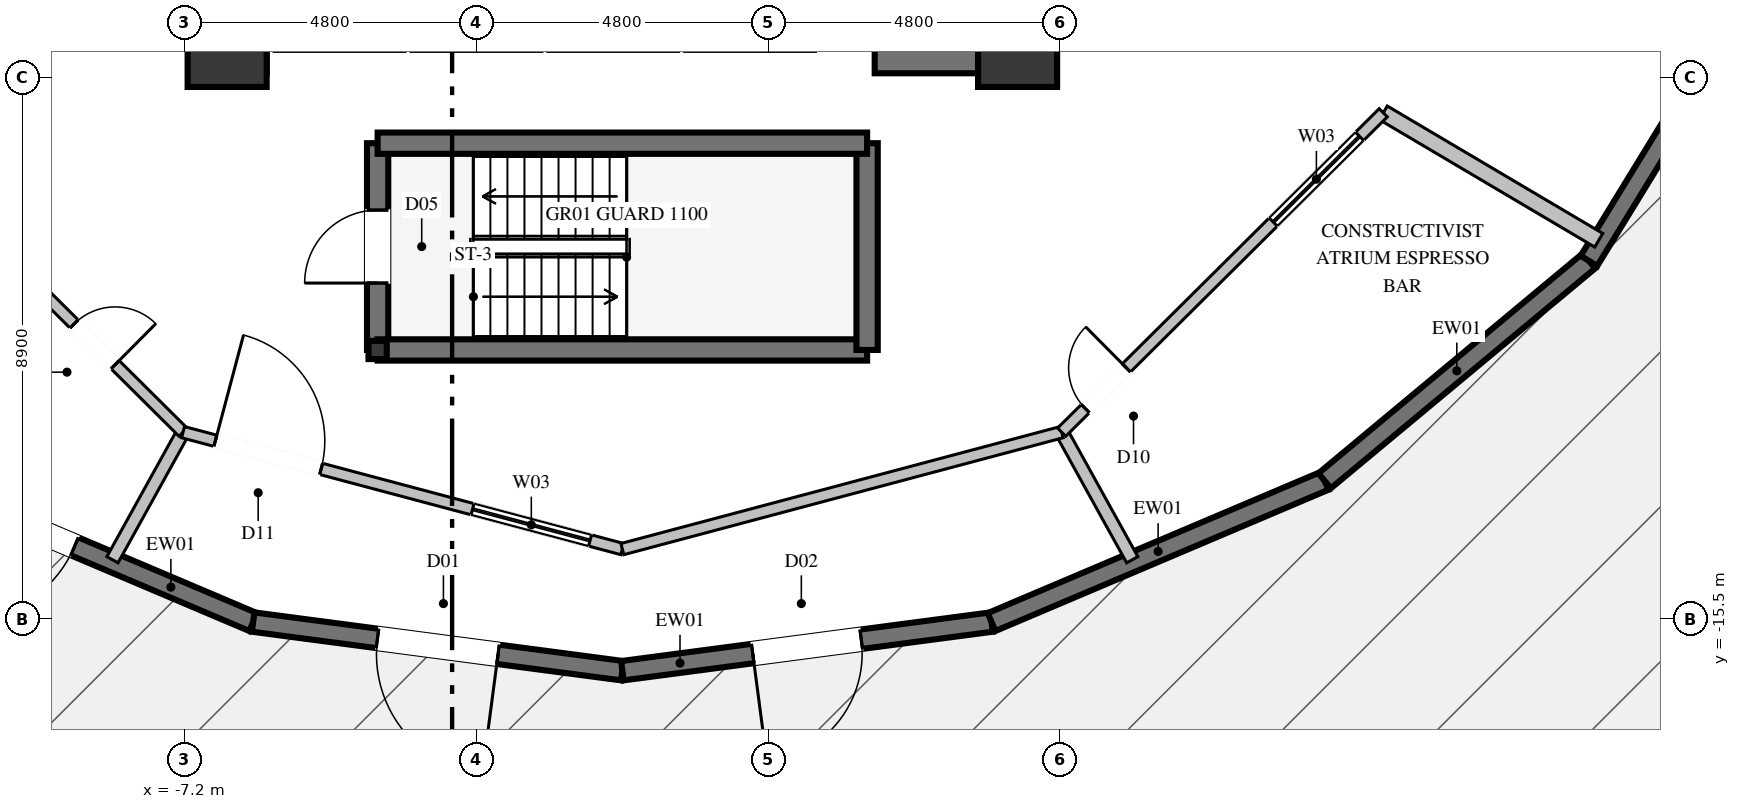
"""IFC4 building model, lengths in metres.
Left out: names, types, materials, properties, quantities, classifications, styles, units other than length and angle.
Written with IfcOpenShell. Run it as: python <this file> out.ifc"""

import sys

from ifc_helpers import new_model, si_unit, direction, frame, frame_2d, origin, origin_2d, place, context, subcontext, project, spatial, rectangle, hollow_rectangle, extrude, element, fill, save


model = new_model("IFC4")
c1 = context("Model", 3, precision=1e-05, world=origin(), true_north=direction((0.0, 1.0)))
c2 = subcontext(c1, "Body", "Model", "MODEL_VIEW")
j1 = project(units=[si_unit("LENGTHUNIT", "METRE"), si_unit("PLANEANGLEUNIT", "RADIAN")], contexts=[c1])
p1 = place(None, origin())
s1 = spatial("IfcSite", under=j1, at=p1, CompositionType="ELEMENT")
p2 = place(p1, origin())
s2 = spatial("IfcBuilding", under=s1, at=p2, CompositionType="ELEMENT")
p3 = place(p2, origin())
s3 = spatial("IfcBuildingStorey", under=s2, at=p3, CompositionType="ELEMENT", Elevation=0.0)
for number, where, z_axis, x_axis in (
    (1, (-6.5, -6.1, 0.0), (0.0, 0.0, 1.0), (1.0, 0.0, 0.0)),
    (2, (6.5, -6.1, 0.0), (0.0, 0.0, 1.0), (1.0, 0.0, 0.0)),
):
    element("IfcColumn", number, at=place(p3, frame(where, z_axis=z_axis, x_axis=x_axis)), inside=s3, PredefinedType="COLUMN", context=c2, shape_type="SweptSolid", body=[
        extrude(rectangle(XDim=1.3, YDim=1.3, at=origin_2d()), origin(), (0.0, 0.0, 1.0), 7.2),
    ])
p4 = place(p3, frame((-6.075, -6.1, 0.0), z_axis=(0.0, 0.0, 1.0), x_axis=(1.0, 0.0, 0.0)))
e3 = element("IfcWall", 3, at=p4, inside=s3, PredefinedType="SHEAR", context=c2, shape_type="SweptSolid", body=[
    extrude(rectangle(XDim=0.225, YDim=0.85, at=frame_2d((0.112, 0.0))), origin(), (0.0, 0.0, 1.0), 7.2),
])
p5 = place(p3, frame((4.15, -6.1, 0.0), z_axis=(0.0, 0.0, 1.0), x_axis=(1.0, 0.0, 0.0)))
e4 = element("IfcWall", 4, at=p5, inside=s3, PredefinedType="SHEAR", context=c2, shape_type="SweptSolid", body=[
    extrude(rectangle(XDim=1.925, YDim=0.85, at=frame_2d((0.962, 0.0))), origin(), (0.0, 0.0, 1.0), 7.2),
])
p6 = place(p3, frame((-6.5, -6.525, 0.0), z_axis=(0.0, 0.0, 1.0), x_axis=(0.0, 1.0, 0.0)))
e5 = element("IfcWall", 5, at=p6, inside=s3, PredefinedType="SHEAR", context=c2, shape_type="SweptSolid", body=[
    extrude(rectangle(XDim=3.175, YDim=0.85, at=frame_2d((1.587, 0.0))), origin(), (0.0, 0.0, 1.0), 7.2),
])
p7 = place(p3, frame((6.5, -6.525, 0.0), z_axis=(0.0, 0.0, 1.0), x_axis=(0.0, 1.0, 0.0)))
e6 = element("IfcWall", 6, at=p7, inside=s3, PredefinedType="SHEAR", context=c2, shape_type="SweptSolid", body=[
    extrude(rectangle(XDim=4.175, YDim=0.85, at=frame_2d((2.087, 0.0))), origin(), (0.0, 0.0, 1.0), 7.2),
])
p8 = place(p3, frame((-4.025, -11.075, 0.0), z_axis=(0.0, 0.0, 1.0), x_axis=(1.0, 0.0, 0.0)))
e7 = element("IfcColumn", 7, at=p8, inside=s3, PredefinedType="COLUMN", context=c2, shape_type="SweptSolid", body=[
    extrude(hollow_rectangle(XDim=0.3, YDim=0.3, WallThickness=0.016, at=origin_2d()), origin(), (0.0, 0.0, 1.0), 7.2),
])
p9 = place(p3, frame((-6.072, -15.55, 0.0), z_axis=(0.0, 0.0, 1.0), x_axis=(-0.920643013012, 0.390405484839, 0.0)))
e8 = element("IfcWall", 8, at=p9, inside=s3, PredefinedType="SOLIDWALL", context=c2, shape_type="SweptSolid", body=[
    extrude(rectangle(XDim=5.95, YDim=0.32, at=frame_2d((2.975, 0.0))), origin(), (0.0, 0.0, 1.0), 6.84),
])
p10 = place(p9, frame((3.19, 0.0, 0.0)))
e9 = element("IfcOpeningElement", 9, at=p10, cuts=e8, PredefinedType="OPENING", context=c2, shape_type="SweptSolid", body=[
    extrude(rectangle(XDim=2.0, YDim=2.4, at=frame_2d((1.0, 1.2))), frame((0.0, 0.17, 0.0), z_axis=(0.0, -1.0, 0.0), x_axis=(1.0, 0.0, 0.0)), (0.0, 0.0, 1.0), 0.34),
])
p11 = place(p3, frame((0.0, -16.35, 0.0), z_axis=(0.0, 0.0, 1.0), x_axis=(-0.991431078494, 0.130630840908, 0.0)))
e10 = element("IfcWall", 10, at=p11, inside=s3, PredefinedType="SOLIDWALL", context=c2, shape_type="SweptSolid", body=[
    extrude(rectangle(XDim=6.125, YDim=0.32, at=frame_2d((3.062, 0.0))), origin(), (0.0, 0.0, 1.0), 6.84),
])
p12 = place(p11, frame((2.062, 0.0, 0.0)))
e11 = element("IfcOpeningElement", 11, at=p12, cuts=e10, PredefinedType="OPENING", context=c2, shape_type="SweptSolid", body=[
    extrude(rectangle(XDim=2.0, YDim=2.4, at=frame_2d((1.0, 1.2))), frame((0.0, 0.17, 0.0), z_axis=(0.0, -1.0, 0.0), x_axis=(1.0, 0.0, 0.0)), (0.0, 0.0, 1.0), 0.34),
])
p13 = place(p3, frame((6.072, -15.55, 0.0), z_axis=(0.0, 0.0, 1.0), x_axis=(-0.991431078494, -0.130630840908, 0.0)))
e12 = element("IfcWall", 12, at=p13, inside=s3, PredefinedType="SOLIDWALL", context=c2, shape_type="SweptSolid", body=[
    extrude(rectangle(XDim=6.125, YDim=0.32, at=frame_2d((3.062, 0.0))), origin(), (0.0, 0.0, 1.0), 6.84),
])
p14 = place(p13, frame((2.162, 0.0, 0.0)))
e13 = element("IfcOpeningElement", 13, at=p14, cuts=e12, PredefinedType="OPENING", context=c2, shape_type="SweptSolid", body=[
    extrude(rectangle(XDim=1.8, YDim=2.4, at=frame_2d((0.9, 1.2))), frame((0.0, 0.17, 0.0), z_axis=(0.0, -1.0, 0.0), x_axis=(1.0, 0.0, 0.0)), (0.0, 0.0, 1.0), 0.34),
])
p15 = place(p3, frame((11.55, -13.227, 0.0), z_axis=(0.0, 0.0, 1.0), x_axis=(-0.920643013012, -0.390405484839, 0.0)))
e14 = element("IfcWall", 14, at=p15, inside=s3, PredefinedType="SOLIDWALL", context=c2, shape_type="SweptSolid", body=[
    extrude(rectangle(XDim=5.95, YDim=0.32, at=frame_2d((2.975, 0.0))), origin(), (0.0, 0.0, 1.0), 6.84),
])
p16 = place(p3, frame((15.897, -9.61, 0.0), z_axis=(0.0, 0.0, 1.0), x_axis=(-0.768698801906, -0.639610937952, 0.0)))
e15 = element("IfcWall", 15, at=p16, inside=s3, PredefinedType="SOLIDWALL", context=c2, shape_type="SweptSolid", body=[
    extrude(rectangle(XDim=5.655, YDim=0.32, at=frame_2d((2.828, 0.0))), origin(), (0.0, 0.0, 1.0), 6.84),
])
p17 = place(p3, frame((18.688, -5.052, 0.0), z_axis=(0.0, 0.0, 1.0), x_axis=(-0.522199966643, -0.852823073585, 0.0)))
e16 = element("IfcWall", 16, at=p17, inside=s3, PredefinedType="SOLIDWALL", context=c2, shape_type="SweptSolid", body=[
    extrude(rectangle(XDim=5.345, YDim=0.32, at=frame_2d((2.672, 0.0))), origin(), (0.0, 0.0, 1.0), 6.84),
])
p18 = place(p3, frame((-4.025, -11.075, 0.0), z_axis=(0.0, 0.0, 1.0), x_axis=(0.0, 1.0, 0.0)))
e17 = element("IfcWall", 17, at=p18, inside=s3, PredefinedType="SOLIDWALL", context=c2, shape_type="SweptSolid", body=[
    extrude(rectangle(XDim=3.4, YDim=0.35, at=frame_2d((1.7, 0.0))), origin(), (0.0, 0.0, 1.0), 6.84),
])
p19 = place(p18, frame((1.1, 0.0, 0.0)))
e18 = element("IfcOpeningElement", 18, at=p19, cuts=e17, PredefinedType="OPENING", context=c2, shape_type="SweptSolid", body=[
    extrude(rectangle(XDim=1.2, YDim=2.2, at=frame_2d((0.6, 1.1))), frame((0.0, 0.185, 0.0), z_axis=(0.0, -1.0, 0.0), x_axis=(1.0, 0.0, 0.0)), (0.0, 0.0, 1.0), 0.37),
])
p20 = place(p3, frame((-4.025, -11.075, 0.0), z_axis=(0.0, 0.0, 1.0), x_axis=(1.0, 0.0, 0.0)))
e19 = element("IfcWall", 19, at=p20, inside=s3, PredefinedType="SOLIDWALL", context=c2, shape_type="SweptSolid", body=[
    extrude(rectangle(XDim=8.05, YDim=0.35, at=frame_2d((4.025, 0.0))), origin(), (0.0, 0.0, 1.0), 6.84),
])
p21 = place(p3, frame((4.025, -11.075, 0.0), z_axis=(0.0, 0.0, 1.0), x_axis=(0.0, 1.0, 0.0)))
e20 = element("IfcWall", 20, at=p21, inside=s3, PredefinedType="SOLIDWALL", context=c2, shape_type="SweptSolid", body=[
    extrude(rectangle(XDim=3.4, YDim=0.35, at=frame_2d((1.7, 0.0))), origin(), (0.0, 0.0, 1.0), 6.84),
])
p22 = place(p3, frame((4.025, -7.675, 0.0), z_axis=(0.0, 0.0, 1.0), x_axis=(-1.0, 0.0, 0.0)))
e21 = element("IfcWall", 21, at=p22, inside=s3, PredefinedType="SOLIDWALL", context=c2, shape_type="SweptSolid", body=[
    extrude(rectangle(XDim=8.05, YDim=0.35, at=frame_2d((4.025, 0.0))), origin(), (0.0, 0.0, 1.0), 6.84),
])
for number, where, z_axis, x_axis in (
    (22, (-7.225, -12.427, 0.0), (0.0, 0.0, 1.0), (-0.484, -0.875, 0.0)),
    (23, (7.225, -12.427, 0.0), (0.0, 0.0, 1.0), (0.484, -0.875, 0.0)),
):
    element("IfcWall", number, at=place(p3, frame(where, z_axis=z_axis, x_axis=x_axis)), inside=s3, PredefinedType="PARTITIONING", context=c2, shape_type="SweptSolid", body=[
        extrude(rectangle(XDim=2.398, YDim=0.21, at=frame_2d((1.199, 0.0))), origin(), (0.0, 0.0, 1.0), 4.625),
    ])
p23 = place(p3, frame((12.514, -7.175, 0.0), z_axis=(0.0, 0.0, 1.0), x_axis=(0.860750596586, -0.509026925101, 0.0)))
e24 = element("IfcWall", 24, at=p23, inside=s3, PredefinedType="PARTITIONING", context=c2, shape_type="SweptSolid", body=[
    extrude(rectangle(XDim=4.118, YDim=0.26, at=frame_2d((2.059, 0.0))), origin(), (0.0, 0.0, 1.0), 4.625),
])
p24 = place(p3, frame((-10.134, -9.538, 0.0), z_axis=(0.0, 0.0, 1.0), x_axis=(0.709544136177, -0.704660995668, 0.0)))
e25 = element("IfcWall", 25, at=p24, inside=s3, PredefinedType="PARTITIONING", context=c2, shape_type="SweptSolid", body=[
    extrude(rectangle(XDim=4.1, YDim=0.19, at=frame_2d((2.05, 0.0))), origin(), (0.0, 0.0, 1.0), 6.84),
])
p25 = place(p24, frame((1.575, 0.0, 0.0)))
e26 = element("IfcOpeningElement", 26, at=p25, cuts=e25, PredefinedType="OPENING", context=c2, shape_type="SweptSolid", body=[
    extrude(rectangle(XDim=0.95, YDim=2.1, at=frame_2d((0.475, 1.05))), frame((0.0, 0.105, 0.0), z_axis=(0.0, -1.0, 0.0), x_axis=(1.0, 0.0, 0.0)), (0.0, 0.0, 1.0), 0.21),
])
p26 = place(p3, frame((-7.225, -12.427, 0.0), z_axis=(0.0, 0.0, 1.0), x_axis=(0.966354610728, -0.25721346451, 0.0)))
e27 = element("IfcWall", 27, at=p26, inside=s3, PredefinedType="PARTITIONING", context=c2, shape_type="SweptSolid", body=[
    extrude(rectangle(XDim=7.477, YDim=0.19, at=frame_2d((3.738, 0.0))), origin(), (0.0, 0.0, 1.0), 6.84),
])
p27 = place(p26, frame((0.55, 0.0, 0.0)))
e28 = element("IfcOpeningElement", 28, at=p27, cuts=e27, PredefinedType="OPENING", context=c2, shape_type="SweptSolid", body=[
    extrude(rectangle(XDim=1.8, YDim=2.4, at=frame_2d((0.9, 1.2))), frame((0.0, 0.105, 0.0), z_axis=(0.0, -1.0, 0.0), x_axis=(1.0, 0.0, 0.0)), (0.0, 0.0, 1.0), 0.21),
])
p28 = place(p26, frame((4.927, 0.0, 0.9)))
e29 = element("IfcOpeningElement", 29, at=p28, cuts=e27, PredefinedType="OPENING", context=c2, shape_type="SweptSolid", body=[
    extrude(rectangle(XDim=2.0, YDim=1.6, at=frame_2d((1.0, 0.8))), frame((0.0, 0.105, 0.0), z_axis=(0.0, -1.0, 0.0), x_axis=(1.0, 0.0, 0.0)), (0.0, 0.0, 1.0), 0.21),
])
p29 = place(p3, frame((0.0, -14.35, 0.0), z_axis=(0.0, 0.0, 1.0), x_axis=(0.966354610728, 0.25721346451, 0.0)))
e30 = element("IfcWall", 30, at=p29, inside=s3, PredefinedType="PARTITIONING", context=c2, shape_type="SweptSolid", body=[
    extrude(rectangle(XDim=7.477, YDim=0.19, at=frame_2d((3.738, 0.0))), origin(), (0.0, 0.0, 1.0), 6.84),
])
p30 = place(p3, frame((7.225, -12.427, 0.0), z_axis=(0.0, 0.0, 1.0), x_axis=(0.709575472763, 0.704629440524, 0.0)))
e31 = element("IfcWall", 31, at=p30, inside=s3, PredefinedType="PARTITIONING", context=c2, shape_type="SweptSolid", body=[
    extrude(rectangle(XDim=7.454, YDim=0.19, at=frame_2d((3.727, 0.0))), origin(), (0.0, 0.0, 1.0), 6.84),
])
p31 = place(p30, frame((0.55, 0.0, 0.0)))
e32 = element("IfcOpeningElement", 32, at=p31, cuts=e31, PredefinedType="OPENING", context=c2, shape_type="SweptSolid", body=[
    extrude(rectangle(XDim=0.95, YDim=2.1, at=frame_2d((0.475, 1.05))), frame((0.0, 0.105, 0.0), z_axis=(0.0, -1.0, 0.0), x_axis=(1.0, 0.0, 0.0)), (0.0, 0.0, 1.0), 0.21),
])
p32 = place(p30, frame((4.904, 0.0, 0.9)))
e33 = element("IfcOpeningElement", 33, at=p32, cuts=e31, PredefinedType="OPENING", context=c2, shape_type="SweptSolid", body=[
    extrude(rectangle(XDim=2.0, YDim=1.6, at=frame_2d((1.0, 0.8))), frame((0.0, 0.105, 0.0), z_axis=(0.0, -1.0, 0.0), x_axis=(1.0, 0.0, 0.0)), (0.0, 0.0, 1.0), 0.21),
])
p33 = place(p10, origin())
e34 = element("IfcDoor", 34, at=p33, inside=s3, OperationType="SINGLE_SWING_RIGHT", PredefinedType="DOOR", context=c2, shape_type="SweptSolid", body=[
    extrude(rectangle(XDim=2.0, YDim=2.4, at=frame_2d((1.0, 1.2))), frame((0.0, 0.025, 0.0), z_axis=(0.0, -1.0, 0.0), x_axis=(1.0, 0.0, 0.0)), (0.0, 0.0, 1.0), 0.05),
])
fill(e9, e34)
p34 = place(p12, origin())
e35 = element("IfcDoor", 35, at=p34, inside=s3, OperationType="SINGLE_SWING_LEFT", PredefinedType="DOOR", context=c2, shape_type="SweptSolid", body=[
    extrude(rectangle(XDim=2.0, YDim=2.4, at=frame_2d((1.0, 1.2))), frame((0.0, 0.025, 0.0), z_axis=(0.0, -1.0, 0.0), x_axis=(1.0, 0.0, 0.0)), (0.0, 0.0, 1.0), 0.05),
])
fill(e11, e35)
p35 = place(p14, origin())
e36 = element("IfcDoor", 36, at=p35, inside=s3, OperationType="SINGLE_SWING_RIGHT", PredefinedType="DOOR", context=c2, shape_type="SweptSolid", body=[
    extrude(rectangle(XDim=1.8, YDim=2.4, at=frame_2d((0.9, 1.2))), frame((0.0, 0.025, 0.0), z_axis=(0.0, -1.0, 0.0), x_axis=(1.0, 0.0, 0.0)), (0.0, 0.0, 1.0), 0.05),
])
fill(e13, e36)
p36 = place(p19, origin())
e37 = element("IfcDoor", 37, at=p36, inside=s3, OperationType="SINGLE_SWING_LEFT", PredefinedType="DOOR", context=c2, shape_type="SweptSolid", body=[
    extrude(rectangle(XDim=1.2, YDim=2.2, at=frame_2d((0.6, 1.1))), frame((0.0, 0.025, 0.0), z_axis=(0.0, -1.0, 0.0), x_axis=(1.0, 0.0, 0.0)), (0.0, 0.0, 1.0), 0.05),
])
fill(e18, e37)
p37 = place(p25, origin())
e38 = element("IfcDoor", 38, at=p37, inside=s3, OperationType="SINGLE_SWING_RIGHT", PredefinedType="DOOR", context=c2, shape_type="SweptSolid", body=[
    extrude(rectangle(XDim=0.95, YDim=2.1, at=frame_2d((0.475, 1.05))), frame((0.0, 0.025, 0.0), z_axis=(0.0, -1.0, 0.0), x_axis=(1.0, 0.0, 0.0)), (0.0, 0.0, 1.0), 0.05),
])
fill(e26, e38)
p38 = place(p27, origin())
e39 = element("IfcDoor", 39, at=p38, inside=s3, OperationType="SINGLE_SWING_LEFT", PredefinedType="DOOR", context=c2, shape_type="SweptSolid", body=[
    extrude(rectangle(XDim=1.8, YDim=2.4, at=frame_2d((0.9, 1.2))), frame((0.0, 0.025, 0.0), z_axis=(0.0, -1.0, 0.0), x_axis=(1.0, 0.0, 0.0)), (0.0, 0.0, 1.0), 0.05),
])
fill(e28, e39)
p39 = place(p28, origin())
e40 = element("IfcWindow", 40, at=p39, inside=s3, PartitioningType="SINGLE_PANEL", PredefinedType="WINDOW", context=c2, shape_type="SweptSolid", body=[
    extrude(rectangle(XDim=2.0, YDim=1.6, at=frame_2d((1.0, 0.8))), frame((0.0, 0.03, 0.0), z_axis=(0.0, -1.0, 0.0), x_axis=(1.0, 0.0, 0.0)), (0.0, 0.0, 1.0), 0.06),
])
fill(e29, e40)
p40 = place(p31, origin())
e41 = element("IfcDoor", 41, at=p40, inside=s3, OperationType="SINGLE_SWING_RIGHT", PredefinedType="DOOR", context=c2, shape_type="SweptSolid", body=[
    extrude(rectangle(XDim=0.95, YDim=2.1, at=frame_2d((0.475, 1.05))), frame((0.0, 0.025, 0.0), z_axis=(0.0, -1.0, 0.0), x_axis=(1.0, 0.0, 0.0)), (0.0, 0.0, 1.0), 0.05),
])
fill(e32, e41)
p41 = place(p32, origin())
e42 = element("IfcWindow", 42, at=p41, inside=s3, PartitioningType="SINGLE_PANEL", PredefinedType="WINDOW", context=c2, shape_type="SweptSolid", body=[
    extrude(rectangle(XDim=2.0, YDim=1.6, at=frame_2d((1.0, 0.8))), frame((0.0, 0.03, 0.0), z_axis=(0.0, -1.0, 0.0), x_axis=(1.0, 0.0, 0.0)), (0.0, 0.0, 1.0), 0.06),
])
fill(e33, e42)
save(model, sys.argv[1])
